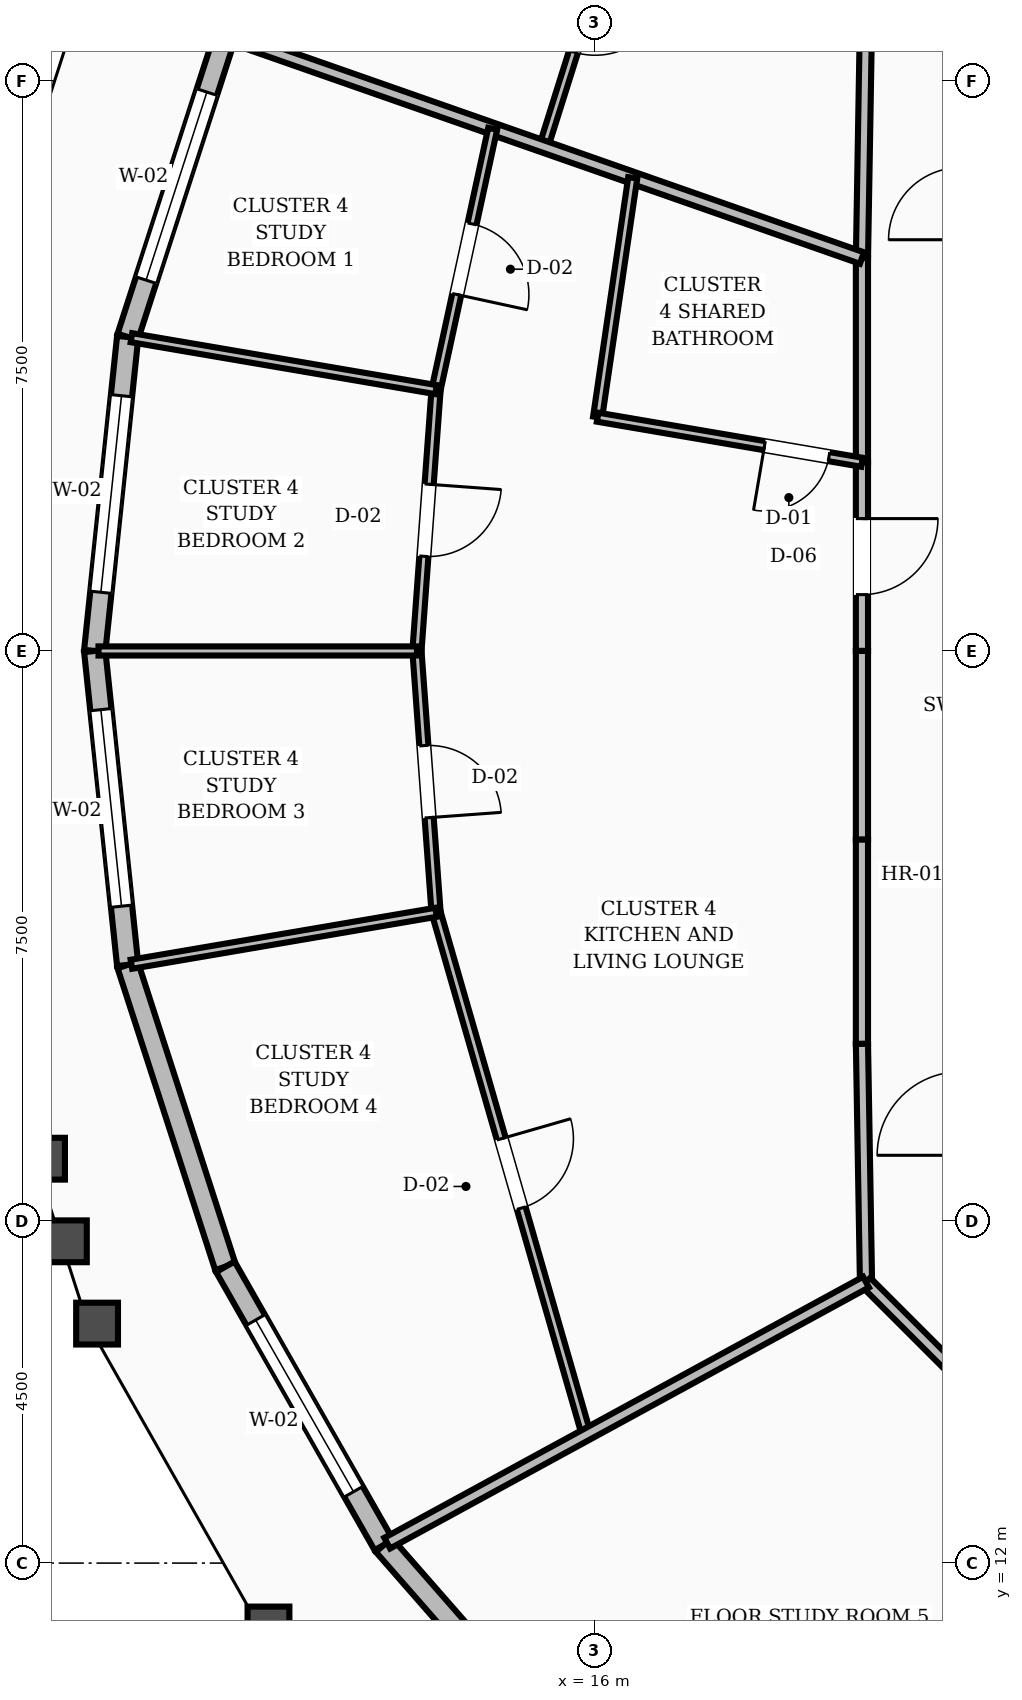
"""IFC4 building model, lengths in metres.
Left out: names, types, materials, properties, quantities, classifications, styles, units other than length and angle.
Written with IfcOpenShell. Run it as: python <this file> out.ifc"""

import sys

from ifc_helpers import new_model, si_unit, direction, frame, frame_2d, origin, place, context, subcontext, project, spatial, rectangle, extrude, element, fill, save


model = new_model("IFC4")
c1 = context("Model", 3, precision=1e-05, world=origin(), true_north=direction((0.0, 1.0)))
c2 = subcontext(c1, "Body", "Model", "MODEL_VIEW")
j1 = project(units=[si_unit("LENGTHUNIT", "METRE"), si_unit("PLANEANGLEUNIT", "RADIAN")], contexts=[c1])
p1 = place(None, origin())
s1 = spatial("IfcSite", under=j1, at=p1, CompositionType="ELEMENT")
p2 = place(p1, origin())
s2 = spatial("IfcBuilding", under=s1, at=p2, CompositionType="ELEMENT")
p3 = place(p2, frame((0.0, 0.0, 229.2)))
s3 = spatial("IfcBuildingStorey", under=s2, at=p3, CompositionType="ELEMENT", Elevation=229.2)
p4 = place(p3, frame((11.144, 32.102, 0.0), z_axis=(0.0, 0.0, 1.0), x_axis=(-0.307722172472, -0.951476255389, 0.0)))
e1 = element("IfcWall", 1, at=p4, inside=s3, PredefinedType="STANDARD", context=c2, shape_type="SweptSolid", body=[
    extrude(rectangle(XDim=4.174, YDim=0.28, at=frame_2d((2.087, 0.0))), origin(), (0.0, 0.0, 1.0), 2.88),
])
p5 = place(p4, frame((0.787, 0.0, 0.8)))
e2 = element("IfcOpeningElement", 2, at=p5, cuts=e1, PredefinedType="OPENING", context=c2, shape_type="SweptSolid", body=[
    extrude(rectangle(XDim=2.6, YDim=1.65, at=frame_2d((1.3, 0.825))), frame((0.0, 0.15, 0.0), z_axis=(0.0, -1.0, 0.0), x_axis=(1.0, 0.0, 0.0)), (0.0, 0.0, 1.0), 0.3),
])
p6 = place(p3, frame((9.86, 28.13, 0.0), z_axis=(0.0, 0.0, 1.0), x_axis=(-0.104467505457, -0.994528300404, 0.0)))
e3 = element("IfcWall", 3, at=p6, inside=s3, PredefinedType="STANDARD", context=c2, shape_type="SweptSolid", body=[
    extrude(rectangle(XDim=4.153, YDim=0.28, at=frame_2d((2.076, 0.0))), origin(), (0.0, 0.0, 1.0), 2.88),
])
p7 = place(p6, frame((0.776, 0.0, 0.8)))
e4 = element("IfcOpeningElement", 4, at=p7, cuts=e3, PredefinedType="OPENING", context=c2, shape_type="SweptSolid", body=[
    extrude(rectangle(XDim=2.6, YDim=1.65, at=frame_2d((1.3, 0.825))), frame((0.0, 0.15, 0.0), z_axis=(0.0, -1.0, 0.0), x_axis=(1.0, 0.0, 0.0)), (0.0, 0.0, 1.0), 0.3),
])
p8 = place(p3, frame((9.426, 24.0, 0.0), z_axis=(0.0, 0.0, 1.0), x_axis=(0.104467505457, -0.994528300404, 0.0)))
e5 = element("IfcWall", 5, at=p8, inside=s3, PredefinedType="STANDARD", context=c2, shape_type="SweptSolid", body=[
    extrude(rectangle(XDim=4.153, YDim=0.28, at=frame_2d((2.076, 0.0))), origin(), (0.0, 0.0, 1.0), 2.88),
])
p9 = place(p8, frame((0.776, 0.0, 0.8)))
e6 = element("IfcOpeningElement", 6, at=p9, cuts=e5, PredefinedType="OPENING", context=c2, shape_type="SweptSolid", body=[
    extrude(rectangle(XDim=2.6, YDim=1.65, at=frame_2d((1.3, 0.825))), frame((0.0, 0.15, 0.0), z_axis=(0.0, -1.0, 0.0), x_axis=(1.0, 0.0, 0.0)), (0.0, 0.0, 1.0), 0.3),
])
p10 = place(p3, frame((9.86, 19.87, 0.0), z_axis=(0.0, 0.0, 1.0), x_axis=(0.307722172472, -0.951476255389, 0.0)))
e7 = element("IfcWall", 7, at=p10, inside=s3, PredefinedType="STANDARD", context=c2, shape_type="SweptSolid", body=[
    extrude(rectangle(XDim=4.174, YDim=0.28, at=frame_2d((2.087, 0.0))), origin(), (0.0, 0.0, 1.0), 2.88),
])
p11 = place(p3, frame((11.144, 15.898, 0.0), z_axis=(0.0, 0.0, 1.0), x_axis=(0.495183798622, -0.868788239782, 0.0)))
e8 = element("IfcWall", 8, at=p11, inside=s3, PredefinedType="STANDARD", context=c2, shape_type="SweptSolid", body=[
    extrude(rectangle(XDim=4.213, YDim=0.28, at=frame_2d((2.106, 0.0))), origin(), (0.0, 0.0, 1.0), 2.88),
])
p12 = place(p11, frame((0.806, 0.0, 0.8)))
e9 = element("IfcOpeningElement", 9, at=p12, cuts=e8, PredefinedType="OPENING", context=c2, shape_type="SweptSolid", body=[
    extrude(rectangle(XDim=2.6, YDim=1.65, at=frame_2d((1.3, 0.825))), frame((0.0, 0.15, 0.0), z_axis=(0.0, -1.0, 0.0), x_axis=(1.0, 0.0, 0.0)), (0.0, 0.0, 1.0), 0.3),
])
p13 = place(p3, frame((13.23, 12.238, 0.0), z_axis=(0.0, 0.0, 1.0), x_axis=(0.65855326106, -0.752534120387, 0.0)))
e10 = element("IfcWall", 10, at=p13, inside=s3, PredefinedType="STANDARD", context=c2, shape_type="SweptSolid", body=[
    extrude(rectangle(XDim=4.263, YDim=0.28, at=frame_2d((2.131, 0.0))), origin(), (0.0, 0.0, 1.0), 2.88),
])
p14 = place(p3, frame((19.573, 32.303, 0.0), z_axis=(0.0, 0.0, 1.0), x_axis=(-0.016981035134, -0.999855811828, 0.0)))
e11 = element("IfcWall", 11, at=p14, inside=s3, PredefinedType="SOLIDWALL", context=c2, shape_type="SweptSolid", body=[
    extrude(rectangle(XDim=3.134, YDim=0.16, at=frame_2d((1.567, 0.0))), origin(), (0.0, 0.0, 1.0), 2.87),
])
p15 = place(p3, frame((19.52, 29.169, 0.0), z_axis=(0.0, 0.0, 1.0), x_axis=(0.0, -1.0, 0.0)))
e12 = element("IfcWall", 12, at=p15, inside=s3, PredefinedType="SOLIDWALL", context=c2, shape_type="SweptSolid", body=[
    extrude(rectangle(XDim=2.687, YDim=0.16, at=frame_2d((1.344, 0.0))), origin(), (0.0, 0.0, 1.0), 2.87),
])
p16 = place(p3, frame((19.52, 26.482, 0.0), z_axis=(0.0, 0.0, 1.0), x_axis=(0.0, -1.0, 0.0)))
e13 = element("IfcWall", 13, at=p16, inside=s3, PredefinedType="SOLIDWALL", context=c2, shape_type="SweptSolid", body=[
    extrude(rectangle(XDim=2.482, YDim=0.16, at=frame_2d((1.241, 0.0))), origin(), (0.0, 0.0, 1.0), 2.87),
])
p17 = place(p16, frame((0.741, 0.0, 0.0)))
e14 = element("IfcOpeningElement", 14, at=p17, cuts=e13, PredefinedType="OPENING", context=c2, shape_type="SweptSolid", body=[
    extrude(rectangle(XDim=1.0, YDim=2.1, at=frame_2d((0.5, 1.05))), frame((0.0, 0.09, 0.0), z_axis=(0.0, -1.0, 0.0), x_axis=(1.0, 0.0, 0.0)), (0.0, 0.0, 1.0), 0.18),
])
p18 = place(p3, frame((19.52, 24.0, 0.0), z_axis=(0.0, 0.0, 1.0), x_axis=(0.0, -1.0, 0.0)))
e15 = element("IfcWall", 15, at=p18, inside=s3, PredefinedType="SOLIDWALL", context=c2, shape_type="SweptSolid", body=[
    extrude(rectangle(XDim=2.482, YDim=0.16, at=frame_2d((1.241, 0.0))), origin(), (0.0, 0.0, 1.0), 2.87),
])
p19 = place(p3, frame((19.52, 21.518, 0.0), z_axis=(0.0, 0.0, 1.0), x_axis=(0.0, -1.0, 0.0)))
e16 = element("IfcWall", 16, at=p19, inside=s3, PredefinedType="SOLIDWALL", context=c2, shape_type="SweptSolid", body=[
    extrude(rectangle(XDim=2.687, YDim=0.16, at=frame_2d((1.344, 0.0))), origin(), (0.0, 0.0, 1.0), 2.87),
])
p20 = place(p3, frame((19.52, 18.831, 0.0), z_axis=(0.0, 0.0, 1.0), x_axis=(0.016981035134, -0.999855811828, 0.0)))
e17 = element("IfcWall", 17, at=p20, inside=s3, PredefinedType="SOLIDWALL", context=c2, shape_type="SweptSolid", body=[
    extrude(rectangle(XDim=3.134, YDim=0.16, at=frame_2d((1.567, 0.0))), origin(), (0.0, 0.0, 1.0), 2.87),
])
p21 = place(p3, frame((19.573, 15.697, 0.0), z_axis=(0.0, 0.0, 1.0), x_axis=(0.707106781187, -0.707106781187, 0.0)))
e18 = element("IfcWall", 18, at=p21, inside=s3, PredefinedType="SOLIDWALL", context=c2, shape_type="SweptSolid", body=[
    extrude(rectangle(XDim=2.916, YDim=0.16, at=frame_2d((1.458, 0.0))), origin(), (0.0, 0.0, 1.0), 2.87),
])
p22 = place(p3, frame((16.402, 34.032, 0.0), z_axis=(0.0, 0.0, 1.0), x_axis=(-0.300389822632, -0.953816520333, 0.0)))
e19 = element("IfcWall", 19, at=p22, inside=s3, PredefinedType="PARTITIONING", context=c2, shape_type="SweptSolid", body=[
    extrude(rectangle(XDim=3.562, YDim=0.12, at=frame_2d((1.781, 0.0))), origin(), (0.0, 0.0, 1.0), 2.87),
])
p23 = place(p22, frame((1.306, 0.0, 0.0)))
e20 = element("IfcOpeningElement", 20, at=p23, cuts=e19, PredefinedType="OPENING", context=c2, shape_type="SweptSolid", body=[
    extrude(rectangle(XDim=0.95, YDim=2.1, at=frame_2d((0.475, 1.05))), frame((0.0, 0.07, 0.0), z_axis=(0.0, -1.0, 0.0), x_axis=(1.0, 0.0, 0.0)), (0.0, 0.0, 1.0), 0.14),
])
p24 = place(p3, frame((19.52, 29.169, 0.0), z_axis=(0.0, 0.0, 1.0), x_axis=(-0.943840238758, 0.33040218477, 0.0)))
e21 = element("IfcWall", 21, at=p24, inside=s3, PredefinedType="SOLIDWALL", context=c2, shape_type="SweptSolid", body=[
    extrude(rectangle(XDim=8.824, YDim=0.16, at=frame_2d((4.412, 0.0))), origin(), (0.0, 0.0, 1.0), 2.87),
])
p25 = place(p3, frame((16.505, 30.225, 0.0), z_axis=(0.0, 0.0, 1.0), x_axis=(-0.145264349806, -0.989392878828, 0.0)))
e22 = element("IfcWall", 22, at=p25, inside=s3, PredefinedType="PARTITIONING", context=c2, shape_type="SweptSolid", body=[
    extrude(rectangle(XDim=3.183, YDim=0.12, at=frame_2d((1.592, 0.0))), origin(), (0.0, 0.0, 1.0), 2.87),
])
p26 = place(p3, frame((19.52, 26.482, 0.0), z_axis=(0.0, 0.0, 1.0), x_axis=(-0.985760215804, 0.16815706033, 0.0)))
e23 = element("IfcWall", 23, at=p26, inside=s3, PredefinedType="PARTITIONING", context=c2, shape_type="SweptSolid", body=[
    extrude(rectangle(XDim=3.528, YDim=0.12, at=frame_2d((1.764, 0.0))), origin(), (0.0, 0.0, 1.0), 2.87),
])
p27 = place(p26, frame((0.44, 0.0, 0.0)))
e24 = element("IfcOpeningElement", 24, at=p27, cuts=e23, PredefinedType="OPENING", context=c2, shape_type="SweptSolid", body=[
    extrude(rectangle(XDim=0.86, YDim=2.1, at=frame_2d((0.43, 1.05))), frame((0.0, 0.07, 0.0), z_axis=(0.0, -1.0, 0.0), x_axis=(1.0, 0.0, 0.0)), (0.0, 0.0, 1.0), 0.14),
])
p28 = place(p3, frame((14.662, 30.87, 0.0), z_axis=(0.0, 0.0, 1.0), x_axis=(-0.212158353799, -0.977235300689, 0.0)))
e25 = element("IfcWall", 25, at=p28, inside=s3, PredefinedType="PARTITIONING", context=c2, shape_type="SweptSolid", body=[
    extrude(rectangle(XDim=3.512, YDim=0.12, at=frame_2d((1.756, 0.0))), origin(), (0.0, 0.0, 1.0), 2.87),
])
p29 = place(p28, frame((1.281, 0.0, 0.0)))
e26 = element("IfcOpeningElement", 26, at=p29, cuts=e25, PredefinedType="OPENING", context=c2, shape_type="SweptSolid", body=[
    extrude(rectangle(XDim=0.95, YDim=2.1, at=frame_2d((0.475, 1.05))), frame((0.0, 0.07, 0.0), z_axis=(0.0, -1.0, 0.0), x_axis=(1.0, 0.0, 0.0)), (0.0, 0.0, 1.0), 0.14),
])
p30 = place(p3, frame((13.917, 27.438, 0.0), z_axis=(0.0, 0.0, 1.0), x_axis=(-0.072948147054, -0.997335734766, 0.0)))
e27 = element("IfcWall", 27, at=p30, inside=s3, PredefinedType="PARTITIONING", context=c2, shape_type="SweptSolid", body=[
    extrude(rectangle(XDim=3.447, YDim=0.12, at=frame_2d((1.724, 0.0))), origin(), (0.0, 0.0, 1.0), 2.87),
])
p31 = place(p30, frame((1.249, 0.0, 0.0)))
e28 = element("IfcOpeningElement", 28, at=p31, cuts=e27, PredefinedType="OPENING", context=c2, shape_type="SweptSolid", body=[
    extrude(rectangle(XDim=0.95, YDim=2.1, at=frame_2d((0.475, 1.05))), frame((0.0, 0.07, 0.0), z_axis=(0.0, -1.0, 0.0), x_axis=(1.0, 0.0, 0.0)), (0.0, 0.0, 1.0), 0.14),
])
p32 = place(p3, frame((13.917, 27.438, 0.0), z_axis=(0.0, 0.0, 1.0), x_axis=(-0.98576362556, 0.168137070637, 0.0)))
e29 = element("IfcWall", 29, at=p32, inside=s3, PredefinedType="PARTITIONING", context=c2, shape_type="SweptSolid", body=[
    extrude(rectangle(XDim=4.066, YDim=0.12, at=frame_2d((2.033, 0.0))), origin(), (0.0, 0.0, 1.0), 2.87),
])
p33 = place(p3, frame((13.666, 24.0, 0.0), z_axis=(0.0, 0.0, 1.0), x_axis=(0.072948147054, -0.997335734766, 0.0)))
e30 = element("IfcWall", 30, at=p33, inside=s3, PredefinedType="PARTITIONING", context=c2, shape_type="SweptSolid", body=[
    extrude(rectangle(XDim=3.447, YDim=0.12, at=frame_2d((1.724, 0.0))), origin(), (0.0, 0.0, 1.0), 2.87),
])
p34 = place(p33, frame((1.249, 0.0, 0.0)))
e31 = element("IfcOpeningElement", 31, at=p34, cuts=e30, PredefinedType="OPENING", context=c2, shape_type="SweptSolid", body=[
    extrude(rectangle(XDim=0.95, YDim=2.1, at=frame_2d((0.475, 1.05))), frame((0.0, 0.07, 0.0), z_axis=(0.0, -1.0, 0.0), x_axis=(1.0, 0.0, 0.0)), (0.0, 0.0, 1.0), 0.14),
])
p35 = place(p3, frame((13.666, 24.0, 0.0), z_axis=(0.0, 0.0, 1.0), x_axis=(-1.0, 0.0, 0.0)))
e32 = element("IfcWall", 32, at=p35, inside=s3, PredefinedType="PARTITIONING", context=c2, shape_type="SweptSolid", body=[
    extrude(rectangle(XDim=4.189, YDim=0.12, at=frame_2d((2.095, 0.0))), origin(), (0.0, 0.0, 1.0), 2.87),
])
p36 = place(p3, frame((13.917, 20.562, 0.0), z_axis=(0.0, 0.0, 1.0), x_axis=(0.276547112257, -0.961000361448, 0.0)))
e33 = element("IfcWall", 33, at=p36, inside=s3, PredefinedType="PARTITIONING", context=c2, shape_type="SweptSolid", body=[
    extrude(rectangle(XDim=7.15, YDim=0.12, at=frame_2d((3.575, 0.0))), origin(), (0.0, 0.0, 1.0), 2.87),
])
p37 = place(p36, frame((3.1, 0.0, 0.0)))
e34 = element("IfcOpeningElement", 34, at=p37, cuts=e33, PredefinedType="OPENING", context=c2, shape_type="SweptSolid", body=[
    extrude(rectangle(XDim=0.95, YDim=2.1, at=frame_2d((0.475, 1.05))), frame((0.0, 0.07, 0.0), z_axis=(0.0, -1.0, 0.0), x_axis=(1.0, 0.0, 0.0)), (0.0, 0.0, 1.0), 0.14),
])
p38 = place(p3, frame((13.917, 20.562, 0.0), z_axis=(0.0, 0.0, 1.0), x_axis=(-0.98576362556, -0.168137070637, 0.0)))
e35 = element("IfcWall", 35, at=p38, inside=s3, PredefinedType="PARTITIONING", context=c2, shape_type="SweptSolid", body=[
    extrude(rectangle(XDim=4.066, YDim=0.12, at=frame_2d((2.033, 0.0))), origin(), (0.0, 0.0, 1.0), 2.87),
])
p39 = place(p3, frame((19.573, 15.697, 0.0), z_axis=(0.0, 0.0, 1.0), x_axis=(-0.877963189824, -0.478728145521, 0.0)))
e36 = element("IfcWall", 36, at=p39, inside=s3, PredefinedType="SOLIDWALL", context=c2, shape_type="SweptSolid", body=[
    extrude(rectangle(XDim=7.174, YDim=0.16, at=frame_2d((3.587, 0.0))), origin(), (0.0, 0.0, 1.0), 2.87),
])
p40 = place(p5, origin())
e37 = element("IfcWindow", 37, at=p40, inside=s3, PartitioningType="SINGLE_PANEL", PredefinedType="WINDOW", context=c2, shape_type="SweptSolid", body=[
    extrude(rectangle(XDim=2.6, YDim=1.65, at=frame_2d((1.3, 0.825))), frame((0.0, 0.03, 0.0), z_axis=(0.0, -1.0, 0.0), x_axis=(1.0, 0.0, 0.0)), (0.0, 0.0, 1.0), 0.06),
])
fill(e2, e37)
p41 = place(p7, origin())
e38 = element("IfcWindow", 38, at=p41, inside=s3, PartitioningType="SINGLE_PANEL", PredefinedType="WINDOW", context=c2, shape_type="SweptSolid", body=[
    extrude(rectangle(XDim=2.6, YDim=1.65, at=frame_2d((1.3, 0.825))), frame((0.0, 0.03, 0.0), z_axis=(0.0, -1.0, 0.0), x_axis=(1.0, 0.0, 0.0)), (0.0, 0.0, 1.0), 0.06),
])
fill(e4, e38)
p42 = place(p9, origin())
e39 = element("IfcWindow", 39, at=p42, inside=s3, PartitioningType="SINGLE_PANEL", PredefinedType="WINDOW", context=c2, shape_type="SweptSolid", body=[
    extrude(rectangle(XDim=2.6, YDim=1.65, at=frame_2d((1.3, 0.825))), frame((0.0, 0.03, 0.0), z_axis=(0.0, -1.0, 0.0), x_axis=(1.0, 0.0, 0.0)), (0.0, 0.0, 1.0), 0.06),
])
fill(e6, e39)
p43 = place(p12, origin())
e40 = element("IfcWindow", 40, at=p43, inside=s3, PartitioningType="SINGLE_PANEL", PredefinedType="WINDOW", context=c2, shape_type="SweptSolid", body=[
    extrude(rectangle(XDim=2.6, YDim=1.65, at=frame_2d((1.3, 0.825))), frame((0.0, 0.03, 0.0), z_axis=(0.0, -1.0, 0.0), x_axis=(1.0, 0.0, 0.0)), (0.0, 0.0, 1.0), 0.06),
])
fill(e9, e40)
p44 = place(p27, origin())
e41 = element("IfcDoor", 41, at=p44, inside=s3, OperationType="SINGLE_SWING_RIGHT", PredefinedType="DOOR", context=c2, shape_type="SweptSolid", body=[
    extrude(rectangle(XDim=0.86, YDim=2.1, at=frame_2d((0.43, 1.05))), frame((0.0, 0.025, 0.0), z_axis=(0.0, -1.0, 0.0), x_axis=(1.0, 0.0, 0.0)), (0.0, 0.0, 1.0), 0.05),
])
fill(e24, e41)
p45 = place(p17, origin())
e42 = element("IfcDoor", 42, at=p45, inside=s3, OperationType="SINGLE_SWING_LEFT", PredefinedType="DOOR", context=c2, shape_type="SweptSolid", body=[
    extrude(rectangle(XDim=1.0, YDim=2.1, at=frame_2d((0.5, 1.05))), frame((0.0, 0.025, 0.0), z_axis=(0.0, -1.0, 0.0), x_axis=(1.0, 0.0, 0.0)), (0.0, 0.0, 1.0), 0.05),
])
fill(e14, e42)
p46 = place(p29, origin())
e43 = element("IfcDoor", 43, at=p46, inside=s3, OperationType="SINGLE_SWING_RIGHT", PredefinedType="DOOR", context=c2, shape_type="SweptSolid", body=[
    extrude(rectangle(XDim=0.95, YDim=2.1, at=frame_2d((0.475, 1.05))), frame((0.0, 0.025, 0.0), z_axis=(0.0, -1.0, 0.0), x_axis=(1.0, 0.0, 0.0)), (0.0, 0.0, 1.0), 0.05),
])
fill(e26, e43)
p47 = place(p31, origin())
e44 = element("IfcDoor", 44, at=p47, inside=s3, OperationType="SINGLE_SWING_LEFT", PredefinedType="DOOR", context=c2, shape_type="SweptSolid", body=[
    extrude(rectangle(XDim=0.95, YDim=2.1, at=frame_2d((0.475, 1.05))), frame((0.0, 0.025, 0.0), z_axis=(0.0, -1.0, 0.0), x_axis=(1.0, 0.0, 0.0)), (0.0, 0.0, 1.0), 0.05),
])
fill(e28, e44)
p48 = place(p34, origin())
e45 = element("IfcDoor", 45, at=p48, inside=s3, OperationType="SINGLE_SWING_RIGHT", PredefinedType="DOOR", context=c2, shape_type="SweptSolid", body=[
    extrude(rectangle(XDim=0.95, YDim=2.1, at=frame_2d((0.475, 1.05))), frame((0.0, 0.025, 0.0), z_axis=(0.0, -1.0, 0.0), x_axis=(1.0, 0.0, 0.0)), (0.0, 0.0, 1.0), 0.05),
])
fill(e31, e45)
p49 = place(p37, origin())
e46 = element("IfcDoor", 46, at=p49, inside=s3, OperationType="SINGLE_SWING_LEFT", PredefinedType="DOOR", context=c2, shape_type="SweptSolid", body=[
    extrude(rectangle(XDim=0.95, YDim=2.1, at=frame_2d((0.475, 1.05))), frame((0.0, 0.025, 0.0), z_axis=(0.0, -1.0, 0.0), x_axis=(1.0, 0.0, 0.0)), (0.0, 0.0, 1.0), 0.05),
])
fill(e34, e46)
save(model, sys.argv[1])
